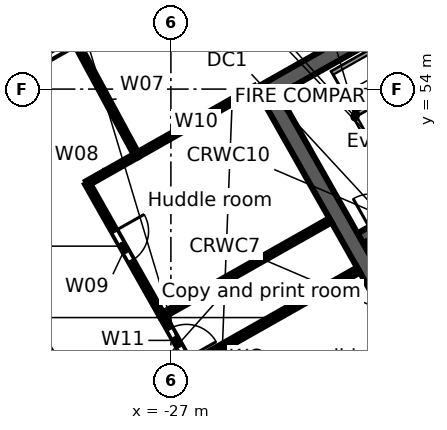
"""IFC4 building model, lengths in metres.
Left out: names, types, materials, properties, quantities, classifications, styles, units other than length and angle.
Written with IfcOpenShell. Run it as: python <this file> out.ifc"""

import sys

from ifc_helpers import new_model, si_unit, direction, frame, frame_2d, origin, place, context, subcontext, project, spatial, rectangle, extrude, element, fill, save


model = new_model("IFC4")
c1 = context("Model", 3, precision=1e-05, world=origin(), true_north=direction((0.0, 1.0)))
c2 = subcontext(c1, "Body", "Model", "MODEL_VIEW")
j1 = project(units=[si_unit("LENGTHUNIT", "METRE"), si_unit("PLANEANGLEUNIT", "RADIAN")], contexts=[c1])
p1 = place(None, origin())
s1 = spatial("IfcSite", under=j1, at=p1, CompositionType="ELEMENT")
p2 = place(p1, origin())
s2 = spatial("IfcBuilding", under=s1, at=p2, CompositionType="ELEMENT")
p3 = place(p2, frame((0.0, 0.0, 227.0)))
s3 = spatial("IfcBuildingStorey", under=s2, at=p3, CompositionType="ELEMENT", Elevation=227.0)
p4 = place(p3, frame((-0.046, 47.974, 0.0), z_axis=(0.0, 0.0, 1.0), x_axis=(-0.870356579543, -0.492421998337, 0.0)))
e1 = element("IfcWall", 1, at=p4, inside=s3, PredefinedType="STANDARD", context=c2, shape_type="SweptSolid", body=[
    extrude(rectangle(XDim=43.754, YDim=0.25, at=frame_2d((21.877, 0.0))), origin(), (0.0, 0.0, 1.0), 3.55),
])
p5 = place(p4, frame((41.061, 0.0, 0.8)))
e2 = element("IfcOpeningElement", 2, at=p5, cuts=e1, PredefinedType="OPENING", context=c2, shape_type="SweptSolid", body=[
    extrude(rectangle(XDim=2.4, YDim=2.2, at=frame_2d((1.2, 1.1))), frame((0.0, 0.135, 0.0), z_axis=(0.0, -1.0, 0.0), x_axis=(1.0, 0.0, 0.0)), (0.0, 0.0, 1.0), 0.27),
])
p6 = place(p4, frame((38.443, 0.0, 0.0)))
e3 = element("IfcOpeningElement", 3, at=p6, cuts=e1, PredefinedType="OPENING", context=c2, shape_type="SweptSolid", body=[
    extrude(rectangle(XDim=1.8, YDim=2.4, at=frame_2d((0.9, 1.2))), frame((0.0, 0.135, 0.0), z_axis=(0.0, -1.0, 0.0), x_axis=(1.0, 0.0, 0.0)), (0.0, 0.0, 1.0), 0.27),
])
p7 = place(p4, frame((35.225, 0.0, 0.8)))
e4 = element("IfcOpeningElement", 4, at=p7, cuts=e1, PredefinedType="OPENING", context=c2, shape_type="SweptSolid", body=[
    extrude(rectangle(XDim=2.4, YDim=2.2, at=frame_2d((1.2, 1.1))), frame((0.0, 0.135, 0.0), z_axis=(0.0, -1.0, 0.0), x_axis=(1.0, 0.0, 0.0)), (0.0, 0.0, 1.0), 0.27),
])
p8 = place(p4, frame((32.307, 0.0, 0.8)))
e5 = element("IfcOpeningElement", 5, at=p8, cuts=e1, PredefinedType="OPENING", context=c2, shape_type="SweptSolid", body=[
    extrude(rectangle(XDim=2.4, YDim=2.2, at=frame_2d((1.2, 1.1))), frame((0.0, 0.135, 0.0), z_axis=(0.0, -1.0, 0.0), x_axis=(1.0, 0.0, 0.0)), (0.0, 0.0, 1.0), 0.27),
])
p9 = place(p4, frame((29.688, 0.0, 0.0)))
e6 = element("IfcOpeningElement", 6, at=p9, cuts=e1, PredefinedType="OPENING", context=c2, shape_type="SweptSolid", body=[
    extrude(rectangle(XDim=1.8, YDim=2.4, at=frame_2d((0.9, 1.2))), frame((0.0, 0.135, 0.0), z_axis=(0.0, -1.0, 0.0), x_axis=(1.0, 0.0, 0.0)), (0.0, 0.0, 1.0), 0.27),
])
p10 = place(p4, frame((26.47, 0.0, 0.8)))
e7 = element("IfcOpeningElement", 7, at=p10, cuts=e1, PredefinedType="OPENING", context=c2, shape_type="SweptSolid", body=[
    extrude(rectangle(XDim=2.4, YDim=2.2, at=frame_2d((1.2, 1.1))), frame((0.0, 0.135, 0.0), z_axis=(0.0, -1.0, 0.0), x_axis=(1.0, 0.0, 0.0)), (0.0, 0.0, 1.0), 0.27),
])
p11 = place(p4, frame((23.552, 0.0, 0.8)))
e8 = element("IfcOpeningElement", 8, at=p11, cuts=e1, PredefinedType="OPENING", context=c2, shape_type="SweptSolid", body=[
    extrude(rectangle(XDim=2.4, YDim=2.2, at=frame_2d((1.2, 1.1))), frame((0.0, 0.135, 0.0), z_axis=(0.0, -1.0, 0.0), x_axis=(1.0, 0.0, 0.0)), (0.0, 0.0, 1.0), 0.27),
])
p12 = place(p4, frame((20.934, 0.0, 0.0)))
e9 = element("IfcOpeningElement", 9, at=p12, cuts=e1, PredefinedType="OPENING", context=c2, shape_type="SweptSolid", body=[
    extrude(rectangle(XDim=1.8, YDim=2.4, at=frame_2d((0.9, 1.2))), frame((0.0, 0.135, 0.0), z_axis=(0.0, -1.0, 0.0), x_axis=(1.0, 0.0, 0.0)), (0.0, 0.0, 1.0), 0.27),
])
p13 = place(p4, frame((17.716, 0.0, 0.8)))
e10 = element("IfcOpeningElement", 10, at=p13, cuts=e1, PredefinedType="OPENING", context=c2, shape_type="SweptSolid", body=[
    extrude(rectangle(XDim=2.4, YDim=2.2, at=frame_2d((1.2, 1.1))), frame((0.0, 0.135, 0.0), z_axis=(0.0, -1.0, 0.0), x_axis=(1.0, 0.0, 0.0)), (0.0, 0.0, 1.0), 0.27),
])
p14 = place(p4, frame((14.798, 0.0, 0.8)))
e11 = element("IfcOpeningElement", 11, at=p14, cuts=e1, PredefinedType="OPENING", context=c2, shape_type="SweptSolid", body=[
    extrude(rectangle(XDim=2.4, YDim=2.2, at=frame_2d((1.2, 1.1))), frame((0.0, 0.135, 0.0), z_axis=(0.0, -1.0, 0.0), x_axis=(1.0, 0.0, 0.0)), (0.0, 0.0, 1.0), 0.27),
])
p15 = place(p4, frame((12.179, 0.0, 0.0)))
e12 = element("IfcOpeningElement", 12, at=p15, cuts=e1, PredefinedType="OPENING", context=c2, shape_type="SweptSolid", body=[
    extrude(rectangle(XDim=1.8, YDim=2.4, at=frame_2d((0.9, 1.2))), frame((0.0, 0.135, 0.0), z_axis=(0.0, -1.0, 0.0), x_axis=(1.0, 0.0, 0.0)), (0.0, 0.0, 1.0), 0.27),
])
p16 = place(p4, frame((8.961, 0.0, 0.8)))
e13 = element("IfcOpeningElement", 13, at=p16, cuts=e1, PredefinedType="OPENING", context=c2, shape_type="SweptSolid", body=[
    extrude(rectangle(XDim=2.4, YDim=2.2, at=frame_2d((1.2, 1.1))), frame((0.0, 0.135, 0.0), z_axis=(0.0, -1.0, 0.0), x_axis=(1.0, 0.0, 0.0)), (0.0, 0.0, 1.0), 0.27),
])
p17 = place(p4, frame((6.043, 0.0, 0.8)))
e14 = element("IfcOpeningElement", 14, at=p17, cuts=e1, PredefinedType="OPENING", context=c2, shape_type="SweptSolid", body=[
    extrude(rectangle(XDim=2.4, YDim=2.2, at=frame_2d((1.2, 1.1))), frame((0.0, 0.135, 0.0), z_axis=(0.0, -1.0, 0.0), x_axis=(1.0, 0.0, 0.0)), (0.0, 0.0, 1.0), 0.27),
])
p18 = place(p4, frame((3.425, 0.0, 0.0)))
e15 = element("IfcOpeningElement", 15, at=p18, cuts=e1, PredefinedType="OPENING", context=c2, shape_type="SweptSolid", body=[
    extrude(rectangle(XDim=1.8, YDim=2.4, at=frame_2d((0.9, 1.2))), frame((0.0, 0.135, 0.0), z_axis=(0.0, -1.0, 0.0), x_axis=(1.0, 0.0, 0.0)), (0.0, 0.0, 1.0), 0.27),
])
p19 = place(p4, frame((0.207, 0.0, 0.8)))
e16 = element("IfcOpeningElement", 16, at=p19, cuts=e1, PredefinedType="OPENING", context=c2, shape_type="SweptSolid", body=[
    extrude(rectangle(XDim=2.4, YDim=2.2, at=frame_2d((1.2, 1.1))), frame((0.0, 0.135, 0.0), z_axis=(0.0, -1.0, 0.0), x_axis=(1.0, 0.0, 0.0)), (0.0, 0.0, 1.0), 0.27),
])
p20 = place(p3, frame((-58.732, 38.771, 0.0), z_axis=(0.0, 0.0, 1.0), x_axis=(0.870354824205, 0.492425100887, 0.0)))
e17 = element("IfcWall", 17, at=p20, inside=s3, PredefinedType="STANDARD", context=c2, shape_type="SweptSolid", body=[
    extrude(rectangle(XDim=64.006, YDim=0.25, at=frame_2d((32.003, 0.0))), origin(), (0.0, 0.0, 1.0), 3.55),
])
p21 = place(p20, frame((61.259, 0.0, 0.8)))
e18 = element("IfcOpeningElement", 18, at=p21, cuts=e17, PredefinedType="OPENING", context=c2, shape_type="SweptSolid", body=[
    extrude(rectangle(XDim=2.4, YDim=2.2, at=frame_2d((1.2, 1.1))), frame((0.0, 0.135, 0.0), z_axis=(0.0, -1.0, 0.0), x_axis=(1.0, 0.0, 0.0)), (0.0, 0.0, 1.0), 0.27),
])
p22 = place(p20, frame((58.216, 0.0, 0.8)))
e19 = element("IfcOpeningElement", 19, at=p22, cuts=e17, PredefinedType="OPENING", context=c2, shape_type="SweptSolid", body=[
    extrude(rectangle(XDim=2.4, YDim=2.2, at=frame_2d((1.2, 1.1))), frame((0.0, 0.135, 0.0), z_axis=(0.0, -1.0, 0.0), x_axis=(1.0, 0.0, 0.0)), (0.0, 0.0, 1.0), 0.27),
])
p23 = place(p20, frame((55.173, 0.0, 0.8)))
e20 = element("IfcOpeningElement", 20, at=p23, cuts=e17, PredefinedType="OPENING", context=c2, shape_type="SweptSolid", body=[
    extrude(rectangle(XDim=2.4, YDim=2.2, at=frame_2d((1.2, 1.1))), frame((0.0, 0.135, 0.0), z_axis=(0.0, -1.0, 0.0), x_axis=(1.0, 0.0, 0.0)), (0.0, 0.0, 1.0), 0.27),
])
p24 = place(p20, frame((52.129, 0.0, 0.8)))
e21 = element("IfcOpeningElement", 21, at=p24, cuts=e17, PredefinedType="OPENING", context=c2, shape_type="SweptSolid", body=[
    extrude(rectangle(XDim=2.4, YDim=2.2, at=frame_2d((1.2, 1.1))), frame((0.0, 0.135, 0.0), z_axis=(0.0, -1.0, 0.0), x_axis=(1.0, 0.0, 0.0)), (0.0, 0.0, 1.0), 0.27),
])
p25 = place(p20, frame((49.086, 0.0, 0.8)))
e22 = element("IfcOpeningElement", 22, at=p25, cuts=e17, PredefinedType="OPENING", context=c2, shape_type="SweptSolid", body=[
    extrude(rectangle(XDim=2.4, YDim=2.2, at=frame_2d((1.2, 1.1))), frame((0.0, 0.135, 0.0), z_axis=(0.0, -1.0, 0.0), x_axis=(1.0, 0.0, 0.0)), (0.0, 0.0, 1.0), 0.27),
])
p26 = place(p20, frame((46.043, 0.0, 0.8)))
e23 = element("IfcOpeningElement", 23, at=p26, cuts=e17, PredefinedType="OPENING", context=c2, shape_type="SweptSolid", body=[
    extrude(rectangle(XDim=2.4, YDim=2.2, at=frame_2d((1.2, 1.1))), frame((0.0, 0.135, 0.0), z_axis=(0.0, -1.0, 0.0), x_axis=(1.0, 0.0, 0.0)), (0.0, 0.0, 1.0), 0.27),
])
p27 = place(p20, frame((43.0, 0.0, 0.8)))
e24 = element("IfcOpeningElement", 24, at=p27, cuts=e17, PredefinedType="OPENING", context=c2, shape_type="SweptSolid", body=[
    extrude(rectangle(XDim=2.4, YDim=2.2, at=frame_2d((1.2, 1.1))), frame((0.0, 0.135, 0.0), z_axis=(0.0, -1.0, 0.0), x_axis=(1.0, 0.0, 0.0)), (0.0, 0.0, 1.0), 0.27),
])
p28 = place(p20, frame((39.956, 0.0, 0.8)))
e25 = element("IfcOpeningElement", 25, at=p28, cuts=e17, PredefinedType="OPENING", context=c2, shape_type="SweptSolid", body=[
    extrude(rectangle(XDim=2.4, YDim=2.2, at=frame_2d((1.2, 1.1))), frame((0.0, 0.135, 0.0), z_axis=(0.0, -1.0, 0.0), x_axis=(1.0, 0.0, 0.0)), (0.0, 0.0, 1.0), 0.27),
])
p29 = place(p20, frame((36.913, 0.0, 0.8)))
e26 = element("IfcOpeningElement", 26, at=p29, cuts=e17, PredefinedType="OPENING", context=c2, shape_type="SweptSolid", body=[
    extrude(rectangle(XDim=2.4, YDim=2.2, at=frame_2d((1.2, 1.1))), frame((0.0, 0.135, 0.0), z_axis=(0.0, -1.0, 0.0), x_axis=(1.0, 0.0, 0.0)), (0.0, 0.0, 1.0), 0.27),
])
p30 = place(p20, frame((33.87, 0.0, 0.8)))
e27 = element("IfcOpeningElement", 27, at=p30, cuts=e17, PredefinedType="OPENING", context=c2, shape_type="SweptSolid", body=[
    extrude(rectangle(XDim=2.4, YDim=2.2, at=frame_2d((1.2, 1.1))), frame((0.0, 0.135, 0.0), z_axis=(0.0, -1.0, 0.0), x_axis=(1.0, 0.0, 0.0)), (0.0, 0.0, 1.0), 0.27),
])
p31 = place(p20, frame((30.826, 0.0, 0.8)))
e28 = element("IfcOpeningElement", 28, at=p31, cuts=e17, PredefinedType="OPENING", context=c2, shape_type="SweptSolid", body=[
    extrude(rectangle(XDim=2.4, YDim=2.2, at=frame_2d((1.2, 1.1))), frame((0.0, 0.135, 0.0), z_axis=(0.0, -1.0, 0.0), x_axis=(1.0, 0.0, 0.0)), (0.0, 0.0, 1.0), 0.27),
])
p32 = place(p20, frame((27.783, 0.0, 0.8)))
e29 = element("IfcOpeningElement", 29, at=p32, cuts=e17, PredefinedType="OPENING", context=c2, shape_type="SweptSolid", body=[
    extrude(rectangle(XDim=2.4, YDim=2.2, at=frame_2d((1.2, 1.1))), frame((0.0, 0.135, 0.0), z_axis=(0.0, -1.0, 0.0), x_axis=(1.0, 0.0, 0.0)), (0.0, 0.0, 1.0), 0.27),
])
p33 = place(p20, frame((24.74, 0.0, 0.8)))
e30 = element("IfcOpeningElement", 30, at=p33, cuts=e17, PredefinedType="OPENING", context=c2, shape_type="SweptSolid", body=[
    extrude(rectangle(XDim=2.4, YDim=2.2, at=frame_2d((1.2, 1.1))), frame((0.0, 0.135, 0.0), z_axis=(0.0, -1.0, 0.0), x_axis=(1.0, 0.0, 0.0)), (0.0, 0.0, 1.0), 0.27),
])
p34 = place(p20, frame((21.696, 0.0, 0.8)))
e31 = element("IfcOpeningElement", 31, at=p34, cuts=e17, PredefinedType="OPENING", context=c2, shape_type="SweptSolid", body=[
    extrude(rectangle(XDim=2.4, YDim=2.2, at=frame_2d((1.2, 1.1))), frame((0.0, 0.135, 0.0), z_axis=(0.0, -1.0, 0.0), x_axis=(1.0, 0.0, 0.0)), (0.0, 0.0, 1.0), 0.27),
])
p35 = place(p20, frame((18.653, 0.0, 0.8)))
e32 = element("IfcOpeningElement", 32, at=p35, cuts=e17, PredefinedType="OPENING", context=c2, shape_type="SweptSolid", body=[
    extrude(rectangle(XDim=2.4, YDim=2.2, at=frame_2d((1.2, 1.1))), frame((0.0, 0.135, 0.0), z_axis=(0.0, -1.0, 0.0), x_axis=(1.0, 0.0, 0.0)), (0.0, 0.0, 1.0), 0.27),
])
p36 = place(p20, frame((15.61, 0.0, 0.8)))
e33 = element("IfcOpeningElement", 33, at=p36, cuts=e17, PredefinedType="OPENING", context=c2, shape_type="SweptSolid", body=[
    extrude(rectangle(XDim=2.4, YDim=2.2, at=frame_2d((1.2, 1.1))), frame((0.0, 0.135, 0.0), z_axis=(0.0, -1.0, 0.0), x_axis=(1.0, 0.0, 0.0)), (0.0, 0.0, 1.0), 0.27),
])
p37 = place(p20, frame((12.567, 0.0, 0.8)))
e34 = element("IfcOpeningElement", 34, at=p37, cuts=e17, PredefinedType="OPENING", context=c2, shape_type="SweptSolid", body=[
    extrude(rectangle(XDim=2.4, YDim=2.2, at=frame_2d((1.2, 1.1))), frame((0.0, 0.135, 0.0), z_axis=(0.0, -1.0, 0.0), x_axis=(1.0, 0.0, 0.0)), (0.0, 0.0, 1.0), 0.27),
])
p38 = place(p20, frame((9.523, 0.0, 0.8)))
e35 = element("IfcOpeningElement", 35, at=p38, cuts=e17, PredefinedType="OPENING", context=c2, shape_type="SweptSolid", body=[
    extrude(rectangle(XDim=2.4, YDim=2.2, at=frame_2d((1.2, 1.1))), frame((0.0, 0.135, 0.0), z_axis=(0.0, -1.0, 0.0), x_axis=(1.0, 0.0, 0.0)), (0.0, 0.0, 1.0), 0.27),
])
p39 = place(p20, frame((6.48, 0.0, 0.8)))
e36 = element("IfcOpeningElement", 36, at=p39, cuts=e17, PredefinedType="OPENING", context=c2, shape_type="SweptSolid", body=[
    extrude(rectangle(XDim=2.4, YDim=2.2, at=frame_2d((1.2, 1.1))), frame((0.0, 0.135, 0.0), z_axis=(0.0, -1.0, 0.0), x_axis=(1.0, 0.0, 0.0)), (0.0, 0.0, 1.0), 0.27),
])
p40 = place(p20, frame((3.437, 0.0, 0.8)))
e37 = element("IfcOpeningElement", 37, at=p40, cuts=e17, PredefinedType="OPENING", context=c2, shape_type="SweptSolid", body=[
    extrude(rectangle(XDim=2.4, YDim=2.2, at=frame_2d((1.2, 1.1))), frame((0.0, 0.135, 0.0), z_axis=(0.0, -1.0, 0.0), x_axis=(1.0, 0.0, 0.0)), (0.0, 0.0, 1.0), 0.27),
])
p41 = place(p20, frame((0.393, 0.0, 0.8)))
e38 = element("IfcOpeningElement", 38, at=p41, cuts=e17, PredefinedType="OPENING", context=c2, shape_type="SweptSolid", body=[
    extrude(rectangle(XDim=2.4, YDim=2.2, at=frame_2d((1.2, 1.1))), frame((0.0, 0.135, 0.0), z_axis=(0.0, -1.0, 0.0), x_axis=(1.0, 0.0, 0.0)), (0.0, 0.0, 1.0), 0.27),
])
p42 = place(p3, frame((-31.787, 49.542, 0.0), z_axis=(0.0, 0.0, 1.0), x_axis=(0.492421378713, -0.870356930107, 0.0)))
e39 = element("IfcWall", 39, at=p42, inside=s3, PredefinedType="SOLIDWALL", context=c2, shape_type="SweptSolid", body=[
    extrude(rectangle(XDim=13.1, YDim=0.45, at=frame_2d((6.55, 0.0))), origin(), (0.0, 0.0, 1.0), 3.55),
])
p43 = place(p3, frame((-22.015, 50.072, 0.0), z_axis=(0.0, 0.0, 1.0), x_axis=(0.870354900257, 0.492424966466, 0.0)))
e40 = element("IfcWall", 40, at=p43, inside=s3, PredefinedType="SOLIDWALL", context=c2, shape_type="SweptSolid", body=[
    extrude(rectangle(XDim=7.35, YDim=0.3, at=frame_2d((3.675, 0.0))), origin(), (0.0, 0.0, 1.0), 3.55),
])
p44 = place(p43, frame((0.35, 0.0, 0.0)))
e41 = element("IfcOpeningElement", 41, at=p44, cuts=e40, PredefinedType="OPENING", context=c2, shape_type="SweptSolid", body=[
    extrude(rectangle(XDim=1.0, YDim=2.1, at=frame_2d((0.5, 1.05))), frame((0.0, 0.16, 0.0), z_axis=(0.0, -1.0, 0.0), x_axis=(1.0, 0.0, 0.0)), (0.0, 0.0, 1.0), 0.32),
])
p45 = place(p3, frame((-24.66, 53.832, 0.0), z_axis=(0.0, 0.0, 1.0), x_axis=(0.870353598469, 0.492427267353, 0.0)))
e42 = element("IfcWall", 42, at=p45, inside=s3, PredefinedType="SOLIDWALL", context=c2, shape_type="SweptSolid", body=[
    extrude(rectangle(XDim=15.0, YDim=0.45, at=frame_2d((7.5, 0.0))), origin(), (0.0, 0.0, 1.0), 3.55),
])
p46 = place(p3, frame((-24.353, 53.747, 0.0), z_axis=(0.0, 0.0, 1.0), x_axis=(0.492435496286, -0.870348942665, 0.0)))
e43 = element("IfcWall", 43, at=p46, inside=s3, PredefinedType="SOLIDWALL", context=c2, shape_type="SweptSolid", body=[
    extrude(rectangle(XDim=13.1, YDim=0.45, at=frame_2d((6.55, 0.0))), origin(), (0.0, 0.0, 1.0), 3.55),
])
p47 = place(p3, frame((-29.474, 55.181, 0.0), z_axis=(0.0, 0.0, 1.0), x_axis=(0.475344759365, -0.879799613403, 0.0)))
e44 = element("IfcWall", 44, at=p47, inside=s3, PredefinedType="PARTITIONING", context=c2, shape_type="SweptSolid", body=[
    extrude(rectangle(XDim=3.32, YDim=0.125, at=frame_2d((1.66, 0.0))), origin(), (0.0, 0.0, 1.0), 2.83),
])
p48 = place(p3, frame((-29.201, 51.521, 0.0), z_axis=(0.0, 0.0, 1.0), x_axis=(0.870150176056, 0.492786638526, 0.0)))
e45 = element("IfcWall", 45, at=p48, inside=s3, PredefinedType="PARTITIONING", context=c2, shape_type="SweptSolid", body=[
    extrude(rectangle(XDim=1.5, YDim=0.125, at=frame_2d((0.75, 0.0))), origin(), (0.0, 0.0, 1.0), 3.55),
])
p49 = place(p3, frame((-29.201, 51.521, 0.0), z_axis=(0.0, 0.0, 1.0), x_axis=(0.492340861121, -0.870402479587, 0.0)))
e46 = element("IfcWall", 46, at=p49, inside=s3, PredefinedType="PARTITIONING", context=c2, shape_type="SweptSolid", body=[
    extrude(rectangle(XDim=3.999, YDim=0.125, at=frame_2d((2.0, 0.0))), origin(), (0.0, 0.0, 1.0), 3.55),
])
p50 = place(p49, frame((1.45, 0.0, 0.0)))
e47 = element("IfcOpeningElement", 47, at=p50, cuts=e46, PredefinedType="OPENING", context=c2, shape_type="SweptSolid", body=[
    extrude(rectangle(XDim=0.9, YDim=2.1, at=frame_2d((0.45, 1.05))), frame((0.0, 0.073, 0.0), z_axis=(0.0, -1.0, 0.0), x_axis=(1.0, 0.0, 0.0)), (0.0, 0.0, 1.0), 0.145),
])
p51 = place(p3, frame((-27.896, 52.26, 0.0), z_axis=(0.0, 0.0, 1.0), x_axis=(0.870352535776, 0.492429145632, 0.0)))
e48 = element("IfcWall", 48, at=p51, inside=s3, PredefinedType="PARTITIONING", context=c2, shape_type="SweptSolid", body=[
    extrude(rectangle(XDim=3.591, YDim=0.125, at=frame_2d((1.795, 0.0))), origin(), (0.0, 0.0, 1.0), 2.722),
])
p52 = place(p3, frame((-27.232, 48.04, 0.0), z_axis=(0.0, 0.0, 1.0), x_axis=(0.492437810475, -0.870347633314, 0.0)))
e49 = element("IfcWall", 49, at=p52, inside=s3, PredefinedType="PARTITIONING", context=c2, shape_type="SweptSolid", body=[
    extrude(rectangle(XDim=1.501, YDim=0.125, at=frame_2d((0.75, 0.0))), origin(), (0.0, 0.0, 1.0), 3.55),
])
p53 = place(p52, frame((0.4, 0.0, 0.0)))
e50 = element("IfcOpeningElement", 50, at=p53, cuts=e49, PredefinedType="OPENING", context=c2, shape_type="SweptSolid", body=[
    extrude(rectangle(XDim=0.9, YDim=2.1, at=frame_2d((0.45, 1.05))), frame((0.0, 0.073, 0.0), z_axis=(0.0, -1.0, 0.0), x_axis=(1.0, 0.0, 0.0)), (0.0, 0.0, 1.0), 0.145),
])
p54 = place(p3, frame((-27.232, 48.04, 0.0), z_axis=(0.0, 0.0, 1.0), x_axis=(0.870339461844, 0.492452252668, 0.0)))
e51 = element("IfcWall", 51, at=p54, inside=s3, PredefinedType="PARTITIONING", context=c2, shape_type="SweptSolid", body=[
    extrude(rectangle(XDim=5.091, YDim=0.125, at=frame_2d((2.545, 0.0))), origin(), (0.0, 0.0, 1.0), 2.722),
])
p55 = place(p3, frame((-26.493, 46.734, 0.0), z_axis=(0.0, 0.0, 1.0), x_axis=(0.870339461844, 0.492452252668, 0.0)))
e52 = element("IfcWall", 52, at=p55, inside=s3, PredefinedType="PARTITIONING", context=c2, shape_type="SweptSolid", body=[
    extrude(rectangle(XDim=5.091, YDim=0.15, at=frame_2d((2.545, 0.0))), origin(), (0.0, 0.0, 1.0), 2.722),
])
p56 = place(p31, origin())
e53 = element("IfcWindow", 53, at=p56, inside=s3, PartitioningType="SINGLE_PANEL", PredefinedType="WINDOW", context=c2, shape_type="SweptSolid", body=[
    extrude(rectangle(XDim=2.4, YDim=2.2, at=frame_2d((1.2, 1.1))), frame((0.0, 0.03, 0.0), z_axis=(0.0, -1.0, 0.0), x_axis=(1.0, 0.0, 0.0)), (0.0, 0.0, 1.0), 0.06),
])
fill(e28, e53)
p57 = place(p50, origin())
e54 = element("IfcDoor", 54, at=p57, inside=s3, OperationType="SINGLE_SWING_LEFT", PredefinedType="DOOR", context=c2, shape_type="SweptSolid", body=[
    extrude(rectangle(XDim=0.9, YDim=2.1, at=frame_2d((0.45, 1.05))), frame((0.0, 0.025, 0.0), z_axis=(0.0, -1.0, 0.0), x_axis=(1.0, 0.0, 0.0)), (0.0, 0.0, 1.0), 0.05),
])
fill(e47, e54)
p58 = place(p53, origin())
e55 = element("IfcDoor", 55, at=p58, inside=s3, OperationType="SINGLE_SWING_RIGHT", PredefinedType="DOOR", context=c2, shape_type="SweptSolid", body=[
    extrude(rectangle(XDim=0.9, YDim=2.1, at=frame_2d((0.45, 1.05))), frame((0.0, 0.025, 0.0), z_axis=(0.0, -1.0, 0.0), x_axis=(1.0, 0.0, 0.0)), (0.0, 0.0, 1.0), 0.05),
])
fill(e50, e55)
save(model, sys.argv[1])
